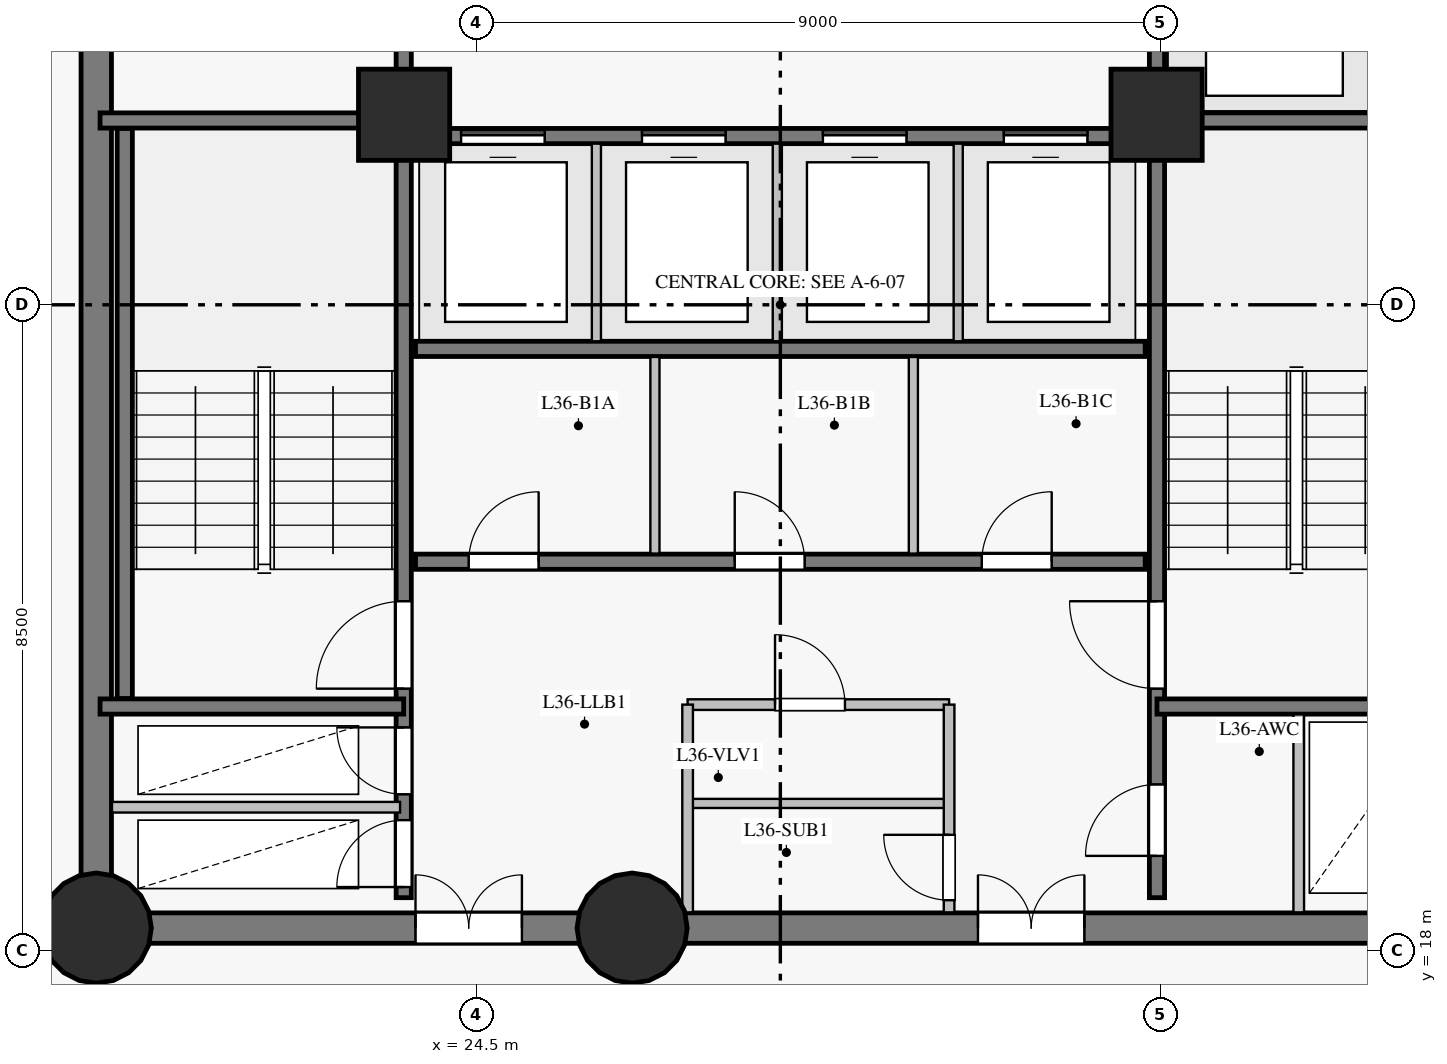
"""IFC4 building model, lengths in metres.
Left out: names, types, materials, properties, quantities, classifications, styles, units other than length and angle.
Written with IfcOpenShell. Run it as: python <this file> out.ifc"""

import sys

from ifc_helpers import new_model, si_unit, direction, frame, frame_2d, origin, origin_with_axes, origin_2d, place, context, subcontext, project, spatial, rectangle, circle, extrude, source, transform, mapped, element, fill, save


model = new_model("IFC4")
c1 = context("Model", 3, precision=1e-05, world=origin(), true_north=direction((0.0, 1.0)))
c2 = subcontext(c1, "Body", "Model", "MODEL_VIEW")
j1 = project(units=[si_unit("LENGTHUNIT", "METRE"), si_unit("PLANEANGLEUNIT", "RADIAN")], contexts=[c1])
p1 = place(None, origin())
s1 = spatial("IfcSite", under=j1, at=p1, CompositionType="ELEMENT")
p2 = place(p1, origin())
s2 = spatial("IfcBuilding", under=s1, at=p2, CompositionType="ELEMENT")
p3 = place(p2, frame((0.0, 0.0, 129.75)))
s3 = spatial("IfcBuildingStorey", under=s2, at=p3, CompositionType="ELEMENT", Elevation=129.75)
p4 = place(p3, frame((19.5, 18.3, 0.0), z_axis=(0.0, 0.0, 1.0), x_axis=(1.0, 0.0, 0.0)))
e1 = element("IfcWall", 1, at=p4, inside=s3, PredefinedType="SHEAR", context=c2, shape_type="SweptSolid", body=[
    extrude(rectangle(XDim=7.05, YDim=0.4, at=frame_2d((3.525, 0.0))), origin(), (0.0, 0.0, 1.0), 2.825),
])
p5 = place(p4, frame((4.2, 0.0, 0.0)))
e2 = element("IfcOpeningElement", 2, at=p5, cuts=e1, PredefinedType="OPENING", context=c2, shape_type="SweptSolid", body=[
    extrude(rectangle(XDim=1.4, YDim=2.2, at=frame_2d((0.7, 1.1))), frame((0.0, 0.21, 0.0), z_axis=(0.0, -1.0, 0.0), x_axis=(1.0, 0.0, 0.0)), (0.0, 0.0, 1.0), 0.42),
])
p6 = place(p3, frame((26.55, 18.3, 0.0), z_axis=(0.0, 0.0, 1.0), x_axis=(1.0, 0.0, 0.0)))
e3 = element("IfcWall", 3, at=p6, inside=s3, PredefinedType="SHEAR", context=c2, shape_type="SweptSolid", body=[
    extrude(rectangle(XDim=10.95, YDim=0.4, at=frame_2d((5.475, 0.0))), origin(), (0.0, 0.0, 1.0), 2.825),
])
p7 = place(p6, frame((4.55, 0.0, 0.0)))
e4 = element("IfcOpeningElement", 4, at=p7, cuts=e3, PredefinedType="OPENING", context=c2, shape_type="SweptSolid", body=[
    extrude(rectangle(XDim=1.4, YDim=2.2, at=frame_2d((0.7, 1.1))), frame((0.0, 0.21, 0.0), z_axis=(0.0, -1.0, 0.0), x_axis=(1.0, 0.0, 0.0)), (0.0, 0.0, 1.0), 0.42),
])
p8 = place(p3, frame((19.5, 34.7, 0.0), z_axis=(0.0, 0.0, 1.0), x_axis=(0.0, -1.0, 0.0)))
e5 = element("IfcWall", 5, at=p8, inside=s3, PredefinedType="SHEAR", context=c2, shape_type="SweptSolid", body=[
    extrude(rectangle(XDim=16.4, YDim=0.4, at=frame_2d((8.2, 0.0))), origin(), (0.0, 0.0, 1.0), 2.825),
])
p9 = place(p8, frame((3.1, 0.0, 0.0)))
e6 = element("IfcOpeningElement", 6, at=p9, cuts=e5, PredefinedType="OPENING", context=c2, shape_type="SweptSolid", body=[
    extrude(rectangle(XDim=1.1, YDim=2.15, at=frame_2d((0.55, 1.075))), frame((0.0, 0.21, 0.0), z_axis=(0.0, -1.0, 0.0), x_axis=(1.0, 0.0, 0.0)), (0.0, 0.0, 1.0), 0.42),
])
m1 = source(origin_with_axes(), c2, "Body", "SweptSolid", [
    extrude(circle(Radius=0.725, at=origin_2d()), origin(), (0.0, 0.0, 1.0), 3.05),
])
for number, where, z_axis, x_axis in (
    (7, (19.5, 18.3, 0.0), (0.0, 0.0, 1.0), (1.0, 0.0, 0.0)),
    (8, (26.55, 18.3, 0.0), (0.0, 0.0, 1.0), (1.0, 0.0, 0.0)),
):
    element("IfcColumn", number, at=place(p3, frame(where, z_axis=z_axis, x_axis=x_axis)), inside=s3, PredefinedType="COLUMN", context=c2, shape_type="MappedRepresentation", body=[
        mapped(m1, transform((0.0, 0.0, 0.0), scale=1.0)),
    ])
m2 = source(origin_with_axes(), c2, "Body", "SweptSolid", [
    extrude(rectangle(XDim=1.2, YDim=1.2, at=origin_2d()), origin(), (0.0, 0.0, 1.0), 3.05),
])
for number, where, z_axis, x_axis in (
    (9, (23.55, 29.0, 0.0), (0.0, 0.0, 1.0), (1.0, 0.0, 0.0)),
    (10, (33.45, 29.0, 0.0), (0.0, 0.0, 1.0), (1.0, 0.0, 0.0)),
):
    element("IfcColumn", number, at=place(p3, frame(where, z_axis=z_axis, x_axis=x_axis)), inside=s3, PredefinedType="COLUMN", context=c2, shape_type="MappedRepresentation", body=[
        mapped(m2, transform((0.0, 0.0, 0.0), scale=1.0)),
    ])
p10 = place(p3, frame((23.545, 18.7, 0.0), z_axis=(0.0, 0.0, 1.0), x_axis=(0.0, 1.0, 0.0)))
e11 = element("IfcWall", 11, at=p10, inside=s3, PredefinedType="SHEAR", context=c2, shape_type="SweptSolid", body=[
    extrude(rectangle(XDim=15.6, YDim=0.2, at=frame_2d((7.8, 0.0))), origin(), (0.0, 0.0, 1.0), 2.825),
])
p11 = place(p10, frame((2.75, 0.0, 0.0)))
e12 = element("IfcOpeningElement", 12, at=p11, cuts=e11, PredefinedType="OPENING", context=c2, shape_type="SweptSolid", body=[
    extrude(rectangle(XDim=1.15, YDim=2.15, at=frame_2d((0.575, 1.075))), frame((0.0, 0.11, 0.0), z_axis=(0.0, -1.0, 0.0), x_axis=(1.0, 0.0, 0.0)), (0.0, 0.0, 1.0), 0.22),
])
p12 = place(p10, frame((0.14, 0.0, 0.0)))
e13 = element("IfcOpeningElement", 13, at=p12, cuts=e11, PredefinedType="OPENING", context=c2, shape_type="SweptSolid", body=[
    extrude(rectangle(XDim=0.88, YDim=2.1, at=frame_2d((0.44, 1.05))), frame((0.0, 0.11, 0.0), z_axis=(0.0, -1.0, 0.0), x_axis=(1.0, 0.0, 0.0)), (0.0, 0.0, 1.0), 0.22),
])
p13 = place(p10, frame((1.36, 0.0, 0.0)))
e14 = element("IfcOpeningElement", 14, at=p13, cuts=e11, PredefinedType="OPENING", context=c2, shape_type="SweptSolid", body=[
    extrude(rectangle(XDim=0.88, YDim=2.1, at=frame_2d((0.44, 1.05))), frame((0.0, 0.11, 0.0), z_axis=(0.0, -1.0, 0.0), x_axis=(1.0, 0.0, 0.0)), (0.0, 0.0, 1.0), 0.22),
])
p14 = place(p10, frame((12.1, 0.0, 0.0)))
e15 = element("IfcOpeningElement", 15, at=p14, cuts=e11, PredefinedType="OPENING", context=c2, shape_type="SweptSolid", body=[
    extrude(rectangle(XDim=1.12, YDim=2.15, at=frame_2d((0.56, 1.075))), frame((0.0, 0.11, 0.0), z_axis=(0.0, -1.0, 0.0), x_axis=(1.0, 0.0, 0.0)), (0.0, 0.0, 1.0), 0.22),
])
p15 = place(p10, frame((14.05, 0.0, 0.0)))
e16 = element("IfcOpeningElement", 16, at=p15, cuts=e11, PredefinedType="OPENING", context=c2, shape_type="SweptSolid", body=[
    extrude(rectangle(XDim=1.12, YDim=2.15, at=frame_2d((0.56, 1.075))), frame((0.0, 0.11, 0.0), z_axis=(0.0, -1.0, 0.0), x_axis=(1.0, 0.0, 0.0)), (0.0, 0.0, 1.0), 0.22),
])
p16 = place(p3, frame((33.455, 18.7, 0.0), z_axis=(0.0, 0.0, 1.0), x_axis=(0.0, 1.0, 0.0)))
e17 = element("IfcWall", 17, at=p16, inside=s3, PredefinedType="SHEAR", context=c2, shape_type="SweptSolid", body=[
    extrude(rectangle(XDim=15.6, YDim=0.2, at=frame_2d((7.8, 0.0))), origin(), (0.0, 0.0, 1.0), 2.825),
])
p17 = place(p16, frame((2.75, 0.0, 0.0)))
e18 = element("IfcOpeningElement", 18, at=p17, cuts=e17, PredefinedType="OPENING", context=c2, shape_type="SweptSolid", body=[
    extrude(rectangle(XDim=1.15, YDim=2.15, at=frame_2d((0.575, 1.075))), frame((0.0, 0.11, 0.0), z_axis=(0.0, -1.0, 0.0), x_axis=(1.0, 0.0, 0.0)), (0.0, 0.0, 1.0), 0.22),
])
p18 = place(p16, frame((0.55, 0.0, 0.0)))
e19 = element("IfcOpeningElement", 19, at=p18, cuts=e17, PredefinedType="OPENING", context=c2, shape_type="SweptSolid", body=[
    extrude(rectangle(XDim=0.94, YDim=2.1, at=frame_2d((0.47, 1.05))), frame((0.0, 0.11, 0.0), z_axis=(0.0, -1.0, 0.0), x_axis=(1.0, 0.0, 0.0)), (0.0, 0.0, 1.0), 0.22),
])
p19 = place(p3, frame((23.7, 23.12, 0.0), z_axis=(0.0, 0.0, 1.0), x_axis=(1.0, 0.0, 0.0)))
e20 = element("IfcWall", 20, at=p19, inside=s3, PredefinedType="SHEAR", context=c2, shape_type="SweptSolid", body=[
    extrude(rectangle(XDim=9.6, YDim=0.2, at=frame_2d((4.8, 0.0))), origin(), (0.0, 0.0, 1.0), 2.825),
])
p20 = place(p19, frame((0.7, 0.0, 0.0)))
e21 = element("IfcOpeningElement", 21, at=p20, cuts=e20, PredefinedType="OPENING", context=c2, shape_type="SweptSolid", body=[
    extrude(rectangle(XDim=0.92, YDim=2.1, at=frame_2d((0.46, 1.05))), frame((0.0, 0.11, 0.0), z_axis=(0.0, -1.0, 0.0), x_axis=(1.0, 0.0, 0.0)), (0.0, 0.0, 1.0), 0.22),
])
p21 = place(p19, frame((4.2, 0.0, 0.0)))
e22 = element("IfcOpeningElement", 22, at=p21, cuts=e20, PredefinedType="OPENING", context=c2, shape_type="SweptSolid", body=[
    extrude(rectangle(XDim=0.92, YDim=2.1, at=frame_2d((0.46, 1.05))), frame((0.0, 0.11, 0.0), z_axis=(0.0, -1.0, 0.0), x_axis=(1.0, 0.0, 0.0)), (0.0, 0.0, 1.0), 0.22),
])
p22 = place(p19, frame((7.45, 0.0, 0.0)))
e23 = element("IfcOpeningElement", 23, at=p22, cuts=e20, PredefinedType="OPENING", context=c2, shape_type="SweptSolid", body=[
    extrude(rectangle(XDim=0.92, YDim=2.1, at=frame_2d((0.46, 1.05))), frame((0.0, 0.11, 0.0), z_axis=(0.0, -1.0, 0.0), x_axis=(1.0, 0.0, 0.0)), (0.0, 0.0, 1.0), 0.22),
])
p23 = place(p3, frame((23.7, 25.92, 0.0), z_axis=(0.0, 0.0, 1.0), x_axis=(1.0, 0.0, 0.0)))
e24 = element("IfcWall", 24, at=p23, inside=s3, PredefinedType="SHEAR", context=c2, shape_type="SweptSolid", body=[
    extrude(rectangle(XDim=9.6, YDim=0.2, at=frame_2d((4.8, 0.0))), origin(), (0.0, 0.0, 1.0), 2.825),
])
p24 = place(p3, frame((23.7, 28.72, 0.0), z_axis=(0.0, 0.0, 1.0), x_axis=(1.0, 0.0, 0.0)))
e25 = element("IfcWall", 25, at=p24, inside=s3, PredefinedType="SHEAR", context=c2, shape_type="SweptSolid", body=[
    extrude(rectangle(XDim=9.6, YDim=0.2, at=frame_2d((4.8, 0.0))), origin(), (0.0, 0.0, 1.0), 2.825),
])
p25 = place(p24, frame((0.6, 0.0, 0.0)))
e26 = element("IfcOpeningElement", 26, at=p25, cuts=e25, PredefinedType="OPENING", context=c2, shape_type="SweptSolid", body=[
    extrude(rectangle(XDim=1.1, YDim=2.15, at=frame_2d((0.55, 1.075))), frame((0.0, 0.11, 0.0), z_axis=(0.0, -1.0, 0.0), x_axis=(1.0, 0.0, 0.0)), (0.0, 0.0, 1.0), 0.22),
])
p26 = place(p24, frame((2.98, 0.0, 0.0)))
e27 = element("IfcOpeningElement", 27, at=p26, cuts=e25, PredefinedType="OPENING", context=c2, shape_type="SweptSolid", body=[
    extrude(rectangle(XDim=1.1, YDim=2.15, at=frame_2d((0.55, 1.075))), frame((0.0, 0.11, 0.0), z_axis=(0.0, -1.0, 0.0), x_axis=(1.0, 0.0, 0.0)), (0.0, 0.0, 1.0), 0.22),
])
p27 = place(p24, frame((5.36, 0.0, 0.0)))
e28 = element("IfcOpeningElement", 28, at=p27, cuts=e25, PredefinedType="OPENING", context=c2, shape_type="SweptSolid", body=[
    extrude(rectangle(XDim=1.1, YDim=2.15, at=frame_2d((0.55, 1.075))), frame((0.0, 0.11, 0.0), z_axis=(0.0, -1.0, 0.0), x_axis=(1.0, 0.0, 0.0)), (0.0, 0.0, 1.0), 0.22),
])
p28 = place(p24, frame((7.74, 0.0, 0.0)))
e29 = element("IfcOpeningElement", 29, at=p28, cuts=e25, PredefinedType="OPENING", context=c2, shape_type="SweptSolid", body=[
    extrude(rectangle(XDim=1.1, YDim=2.15, at=frame_2d((0.55, 1.075))), frame((0.0, 0.11, 0.0), z_axis=(0.0, -1.0, 0.0), x_axis=(1.0, 0.0, 0.0)), (0.0, 0.0, 1.0), 0.22),
])
p29 = place(p3, frame((19.875, 21.32, 0.0), z_axis=(0.0, 0.0, 1.0), x_axis=(0.0, 1.0, 0.0)))
e30 = element("IfcWall", 30, at=p29, inside=s3, PredefinedType="SHEAR", context=c2, shape_type="SweptSolid", body=[
    extrude(rectangle(XDim=7.5, YDim=0.2, at=frame_2d((3.75, 0.0))), origin(), (0.0, 0.0, 1.0), 2.825),
])
for number, where, z_axis, x_axis in (
    (31, (33.455, 21.215, 0.0), (0.0, 0.0, 1.0), (1.0, 0.0, 0.0)),
    (32, (33.455, 28.925, 0.0), (0.0, 0.0, 1.0), (1.0, 0.0, 0.0)),
    (33, (19.55, 21.215, 0.0), (0.0, 0.0, 1.0), (1.0, 0.0, 0.0)),
    (34, (19.55, 28.925, 0.0), (0.0, 0.0, 1.0), (1.0, 0.0, 0.0)),
):
    element("IfcWall", number, at=place(p3, frame(where, z_axis=z_axis, x_axis=x_axis)), inside=s3, PredefinedType="SHEAR", context=c2, shape_type="SweptSolid", body=[
        extrude(rectangle(XDim=3.995, YDim=0.2, at=frame_2d((1.998, 0.0))), origin(), (0.0, 0.0, 1.0), 2.825),
    ])
p30 = place(p3, frame((19.707, 19.89, 0.0), z_axis=(0.0, 0.0, 1.0), x_axis=(1.0, 0.0, 0.0)))
e35 = element("IfcWall", 35, at=p30, inside=s3, PredefinedType="PARTITIONING", context=c2, shape_type="SweptSolid", body=[
    extrude(rectangle(XDim=3.79, YDim=0.14, at=frame_2d((1.895, 0.0))), origin(), (0.0, 0.0, 1.0), 2.825),
])
p31 = place(p3, frame((27.28, 21.24, 0.0), z_axis=(0.0, 0.0, 1.0), x_axis=(1.0, 0.0, 0.0)))
e36 = element("IfcWall", 36, at=p31, inside=s3, PredefinedType="PARTITIONING", context=c2, shape_type="SweptSolid", body=[
    extrude(rectangle(XDim=3.44, YDim=0.14, at=frame_2d((1.72, 0.0))), origin(), (0.0, 0.0, 1.0), 2.825),
])
p32 = place(p31, frame((1.15, 0.0, 0.0)))
e37 = element("IfcOpeningElement", 37, at=p32, cuts=e36, PredefinedType="OPENING", context=c2, shape_type="SweptSolid", body=[
    extrude(rectangle(XDim=0.92, YDim=2.1, at=frame_2d((0.46, 1.05))), frame((0.0, 0.08, 0.0), z_axis=(0.0, -1.0, 0.0), x_axis=(1.0, 0.0, 0.0)), (0.0, 0.0, 1.0), 0.16),
])
p33 = place(p3, frame((27.28, 19.94, 0.0), z_axis=(0.0, 0.0, 1.0), x_axis=(1.0, 0.0, 0.0)))
e38 = element("IfcWall", 38, at=p33, inside=s3, PredefinedType="PARTITIONING", context=c2, shape_type="SweptSolid", body=[
    extrude(rectangle(XDim=3.44, YDim=0.12, at=frame_2d((1.72, 0.0))), origin(), (0.0, 0.0, 1.0), 2.825),
])
p34 = place(p3, frame((27.28, 18.507, 0.0), z_axis=(0.0, 0.0, 1.0), x_axis=(0.0, 1.0, 0.0)))
e39 = element("IfcWall", 39, at=p34, inside=s3, PredefinedType="PARTITIONING", context=c2, shape_type="SweptSolid", body=[
    extrude(rectangle(XDim=2.733, YDim=0.14, at=frame_2d((1.366, 0.0))), origin(), (0.0, 0.0, 1.0), 2.825),
])
p35 = place(p3, frame((30.72, 18.507, 0.0), z_axis=(0.0, 0.0, 1.0), x_axis=(0.0, 1.0, 0.0)))
e40 = element("IfcWall", 40, at=p35, inside=s3, PredefinedType="PARTITIONING", context=c2, shape_type="SweptSolid", body=[
    extrude(rectangle(XDim=2.733, YDim=0.14, at=frame_2d((1.366, 0.0))), origin(), (0.0, 0.0, 1.0), 2.825),
])
p36 = place(p35, frame((0.16, 0.0, 0.0)))
e41 = element("IfcOpeningElement", 41, at=p36, cuts=e40, PredefinedType="OPENING", context=c2, shape_type="SweptSolid", body=[
    extrude(rectangle(XDim=0.86, YDim=2.1, at=frame_2d((0.43, 1.05))), frame((0.0, 0.08, 0.0), z_axis=(0.0, -1.0, 0.0), x_axis=(1.0, 0.0, 0.0)), (0.0, 0.0, 1.0), 0.16),
])
for number, where, z_axis, x_axis in (
    (42, (26.08, 26.02, 0.0), (0.0, 0.0, 1.0), (0.0, 1.0, 0.0)),
    (43, (28.46, 26.02, 0.0), (0.0, 0.0, 1.0), (0.0, 1.0, 0.0)),
    (44, (30.84, 26.02, 0.0), (0.0, 0.0, 1.0), (0.0, 1.0, 0.0)),
):
    element("IfcWall", number, at=place(p3, frame(where, z_axis=z_axis, x_axis=x_axis)), inside=s3, PredefinedType="PARTITIONING", context=c2, shape_type="SweptSolid", body=[
        extrude(rectangle(XDim=2.6, YDim=0.12, at=frame_2d((1.3, 0.0))), origin(), (0.0, 0.0, 1.0), 2.825),
    ])
for number, where, z_axis, x_axis in (
    (45, (26.85, 23.227, 0.0), (0.0, 0.0, 1.0), (0.0, 1.0, 0.0)),
    (46, (30.25, 23.227, 0.0), (0.0, 0.0, 1.0), (0.0, 1.0, 0.0)),
):
    element("IfcWall", number, at=place(p3, frame(where, z_axis=z_axis, x_axis=x_axis)), inside=s3, PredefinedType="PARTITIONING", context=c2, shape_type="SweptSolid", body=[
        extrude(rectangle(XDim=2.587, YDim=0.12, at=frame_2d((1.293, 0.0))), origin(), (0.0, 0.0, 1.0), 2.825),
    ])
p37 = place(p3, frame((35.32, 18.507, 0.0), z_axis=(0.0, 0.0, 1.0), x_axis=(0.0, 1.0, 0.0)))
e47 = element("IfcWall", 47, at=p37, inside=s3, PredefinedType="PARTITIONING", context=c2, shape_type="SweptSolid", body=[
    extrude(rectangle(XDim=2.604, YDim=0.14, at=frame_2d((1.302, 0.0))), origin(), (0.0, 0.0, 1.0), 2.825),
])
m3 = source(origin_with_axes(), c2, "Body", "SweptSolid", [
    extrude(rectangle(XDim=1.15, YDim=2.15, at=frame_2d((0.575, 1.075))), frame((0.0, 0.025, 0.0), z_axis=(0.0, -1.0, 0.0), x_axis=(1.0, 0.0, 0.0)), (0.0, 0.0, 1.0), 0.05),
])
p38 = place(p11, origin())
e48 = element("IfcDoor", 48, at=p38, inside=s3, OperationType="SINGLE_SWING_LEFT", PredefinedType="DOOR", context=c2, shape_type="MappedRepresentation", body=[
    mapped(m3, transform((0.0, 0.0, 0.0), scale=1.0)),
])
fill(e12, e48)
p39 = place(p17, origin())
e49 = element("IfcDoor", 49, at=p39, inside=s3, OperationType="SINGLE_SWING_RIGHT", PredefinedType="DOOR", context=c2, shape_type="MappedRepresentation", body=[
    mapped(m3, transform((0.0, 0.0, 0.0), scale=1.0)),
])
fill(e18, e49)
m4 = source(origin_with_axes(), c2, "Body", "SweptSolid", [
    extrude(rectangle(XDim=0.88, YDim=2.1, at=frame_2d((0.44, 1.05))), frame((0.0, 0.025, 0.0), z_axis=(0.0, -1.0, 0.0), x_axis=(1.0, 0.0, 0.0)), (0.0, 0.0, 1.0), 0.05),
])
p40 = place(p12, origin())
e50 = element("IfcDoor", 50, at=p40, inside=s3, OperationType="SINGLE_SWING_LEFT", PredefinedType="DOOR", context=c2, shape_type="MappedRepresentation", body=[
    mapped(m4, transform((0.0, 0.0, 0.0), scale=1.0)),
])
fill(e13, e50)
p41 = place(p13, origin())
e51 = element("IfcDoor", 51, at=p41, inside=s3, OperationType="SINGLE_SWING_RIGHT", PredefinedType="DOOR", context=c2, shape_type="MappedRepresentation", body=[
    mapped(m4, transform((0.0, 0.0, 0.0), scale=1.0)),
])
fill(e14, e51)
m5 = source(origin_with_axes(), c2, "Body", "SweptSolid", [
    extrude(rectangle(XDim=1.4, YDim=2.2, at=frame_2d((0.7, 1.1))), frame((0.0, 0.025, 0.0), z_axis=(0.0, -1.0, 0.0), x_axis=(1.0, 0.0, 0.0)), (0.0, 0.0, 1.0), 0.05),
])
p42 = place(p5, origin())
e52 = element("IfcDoor", 52, at=p42, inside=s3, OperationType="DOUBLE_DOOR_SINGLE_SWING", PredefinedType="DOOR", context=c2, shape_type="MappedRepresentation", body=[
    mapped(m5, transform((0.0, 0.0, 0.0), scale=1.0)),
])
fill(e2, e52)
p43 = place(p7, origin())
e53 = element("IfcDoor", 53, at=p43, inside=s3, OperationType="DOUBLE_DOOR_SINGLE_SWING", PredefinedType="DOOR", context=c2, shape_type="MappedRepresentation", body=[
    mapped(m5, transform((0.0, 0.0, 0.0), scale=1.0)),
])
fill(e4, e53)
m6 = source(origin_with_axes(), c2, "Body", "SweptSolid", [
    extrude(rectangle(XDim=0.94, YDim=2.1, at=frame_2d((0.47, 1.05))), frame((0.0, 0.025, 0.0), z_axis=(0.0, -1.0, 0.0), x_axis=(1.0, 0.0, 0.0)), (0.0, 0.0, 1.0), 0.05),
])
p44 = place(p18, origin())
e54 = element("IfcDoor", 54, at=p44, inside=s3, OperationType="SINGLE_SWING_LEFT", PredefinedType="DOOR", context=c2, shape_type="MappedRepresentation", body=[
    mapped(m6, transform((0.0, 0.0, 0.0), scale=1.0)),
])
fill(e19, e54)
m7 = source(origin_with_axes(), c2, "Body", "SweptSolid", [
    extrude(rectangle(XDim=0.86, YDim=2.1, at=frame_2d((0.43, 1.05))), frame((0.0, 0.025, 0.0), z_axis=(0.0, -1.0, 0.0), x_axis=(1.0, 0.0, 0.0)), (0.0, 0.0, 1.0), 0.05),
])
p45 = place(p36, origin())
e55 = element("IfcDoor", 55, at=p45, inside=s3, OperationType="SINGLE_SWING_RIGHT", PredefinedType="DOOR", context=c2, shape_type="MappedRepresentation", body=[
    mapped(m7, transform((0.0, 0.0, 0.0), scale=1.0)),
])
fill(e41, e55)
m8 = source(origin_with_axes(), c2, "Body", "SweptSolid", [
    extrude(rectangle(XDim=0.92, YDim=2.1, at=frame_2d((0.46, 1.05))), frame((0.0, 0.025, 0.0), z_axis=(0.0, -1.0, 0.0), x_axis=(1.0, 0.0, 0.0)), (0.0, 0.0, 1.0), 0.05),
])
p46 = place(p32, origin())
e56 = element("IfcDoor", 56, at=p46, inside=s3, OperationType="SINGLE_SWING_LEFT", PredefinedType="DOOR", context=c2, shape_type="MappedRepresentation", body=[
    mapped(m8, transform((0.0, 0.0, 0.0), scale=1.0)),
])
fill(e37, e56)
p47 = place(p20, origin())
e57 = element("IfcDoor", 57, at=p47, inside=s3, OperationType="SINGLE_SWING_RIGHT", PredefinedType="DOOR", context=c2, shape_type="MappedRepresentation", body=[
    mapped(m8, transform((0.0, 0.0, 0.0), scale=1.0)),
])
fill(e21, e57)
p48 = place(p21, origin())
e58 = element("IfcDoor", 58, at=p48, inside=s3, OperationType="SINGLE_SWING_LEFT", PredefinedType="DOOR", context=c2, shape_type="MappedRepresentation", body=[
    mapped(m8, transform((0.0, 0.0, 0.0), scale=1.0)),
])
fill(e22, e58)
p49 = place(p22, origin())
e59 = element("IfcDoor", 59, at=p49, inside=s3, OperationType="SINGLE_SWING_RIGHT", PredefinedType="DOOR", context=c2, shape_type="MappedRepresentation", body=[
    mapped(m8, transform((0.0, 0.0, 0.0), scale=1.0)),
])
fill(e23, e59)
m9 = source(origin_with_axes(), c2, "Body", "SweptSolid", [
    extrude(rectangle(XDim=1.1, YDim=2.15, at=frame_2d((0.55, 1.075))), frame((0.0, 0.025, 0.0), z_axis=(0.0, -1.0, 0.0), x_axis=(1.0, 0.0, 0.0)), (0.0, 0.0, 1.0), 0.05),
])
p50 = place(p25, origin())
e60 = element("IfcDoor", 60, at=p50, inside=s3, OperationType="SLIDING_TO_LEFT", PredefinedType="DOOR", context=c2, shape_type="MappedRepresentation", body=[
    mapped(m9, transform((0.0, 0.0, 0.0), scale=1.0)),
])
fill(e26, e60)
p51 = place(p26, origin())
e61 = element("IfcDoor", 61, at=p51, inside=s3, OperationType="SLIDING_TO_RIGHT", PredefinedType="DOOR", context=c2, shape_type="MappedRepresentation", body=[
    mapped(m9, transform((0.0, 0.0, 0.0), scale=1.0)),
])
fill(e27, e61)
p52 = place(p27, origin())
e62 = element("IfcDoor", 62, at=p52, inside=s3, OperationType="SLIDING_TO_LEFT", PredefinedType="DOOR", context=c2, shape_type="MappedRepresentation", body=[
    mapped(m9, transform((0.0, 0.0, 0.0), scale=1.0)),
])
fill(e28, e62)
p53 = place(p28, origin())
e63 = element("IfcDoor", 63, at=p53, inside=s3, OperationType="SLIDING_TO_RIGHT", PredefinedType="DOOR", context=c2, shape_type="MappedRepresentation", body=[
    mapped(m9, transform((0.0, 0.0, 0.0), scale=1.0)),
])
fill(e29, e63)
save(model, sys.argv[1])
